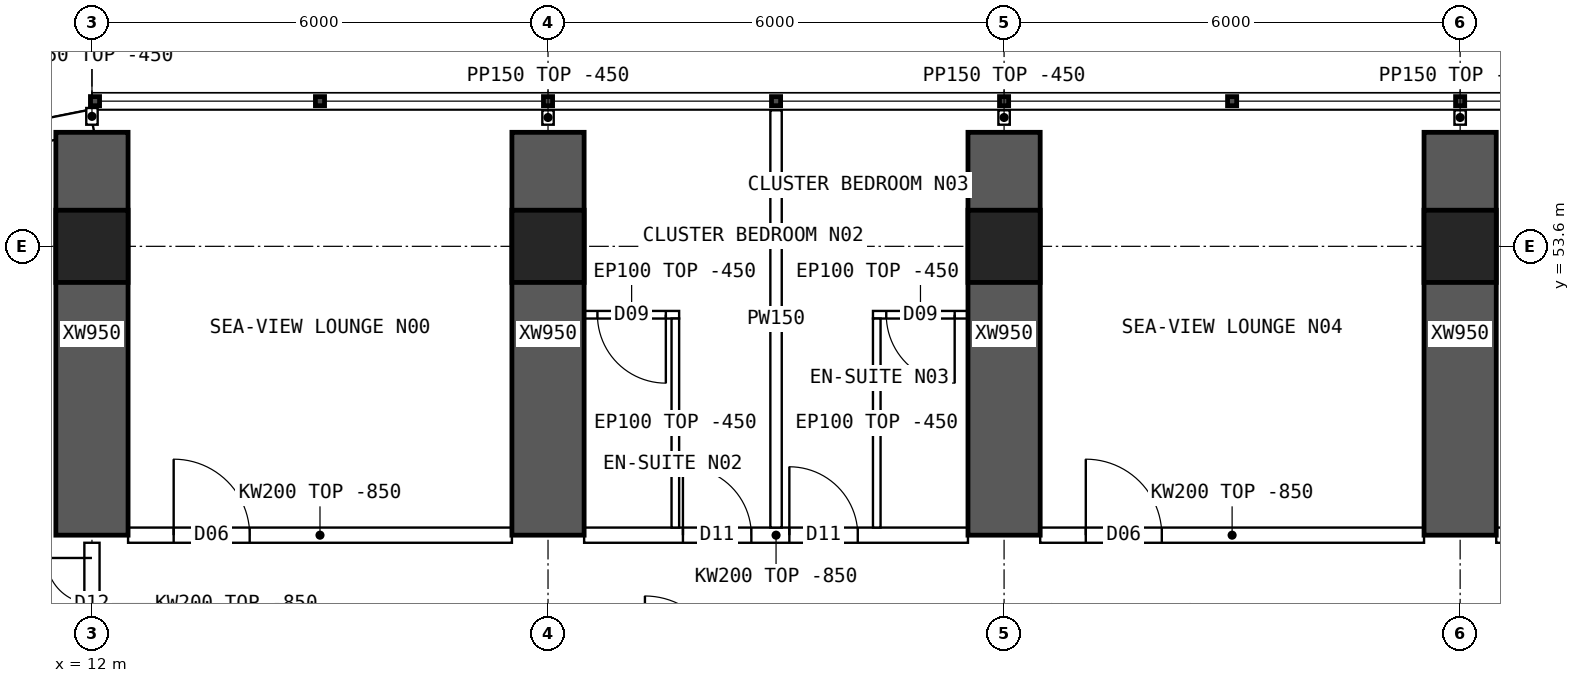
"""IFC4 building model, lengths in metres.
Left out: names, types, materials, properties, quantities, classifications, styles, units other than length and angle.
Written with IfcOpenShell. Run it as: python <this file> out.ifc"""

import sys

from ifc_helpers import new_model, si_unit, direction, frame, frame_2d, origin, origin_2d, place, context, subcontext, project, spatial, polyline, rectangle, hollow_rectangle, outline, extrude, element, fill, save


model = new_model("IFC4")
c1 = context("Model", 3, precision=1e-05, world=origin(), true_north=direction((0.0, 1.0)))
c2 = subcontext(c1, "Body", "Model", "MODEL_VIEW")
j1 = project(units=[si_unit("LENGTHUNIT", "METRE"), si_unit("PLANEANGLEUNIT", "RADIAN")], contexts=[c1])
p1 = place(None, origin())
s1 = spatial("IfcSite", under=j1, at=p1, CompositionType="ELEMENT")
p2 = place(p1, origin())
s2 = spatial("IfcBuilding", under=s1, at=p2, CompositionType="ELEMENT")
p3 = place(p2, frame((0.0, 0.0, 110.65)))
s3 = spatial("IfcBuildingStorey", under=s2, at=p3, CompositionType="ELEMENT", Elevation=110.65)
for number, where, z_axis, x_axis in (
    (1, (12.0, 53.6, 0.0), (0.0, 0.0, 1.0), (1.0, 0.0, 0.0)),
    (2, (18.0, 53.6, 0.0), (0.0, 0.0, 1.0), (1.0, 0.0, 0.0)),
    (3, (24.0, 53.6, 0.0), (0.0, 0.0, 1.0), (1.0, 0.0, 0.0)),
    (4, (30.0, 53.6, 0.0), (0.0, 0.0, 1.0), (1.0, 0.0, 0.0)),
):
    element("IfcColumn", number, at=place(p3, frame(where, z_axis=z_axis, x_axis=x_axis)), inside=s3, PredefinedType="COLUMN", context=c2, shape_type="SweptSolid", body=[
        extrude(hollow_rectangle(XDim=0.95, YDim=0.95, WallThickness=0.095, at=origin_2d()), origin(), (0.0, 0.0, 1.0), 3.75),
    ])
for number, where, z_axis, x_axis in (
    (5, (12.0, 49.8, 0.0), (0.0, 0.0, 1.0), (0.0, 1.0, 0.0)),
    (6, (18.0, 49.8, 0.0), (0.0, 0.0, 1.0), (0.0, 1.0, 0.0)),
    (7, (24.0, 49.8, 0.0), (0.0, 0.0, 1.0), (0.0, 1.0, 0.0)),
    (8, (30.0, 49.8, 0.0), (0.0, 0.0, 1.0), (0.0, 1.0, 0.0)),
):
    element("IfcWall", number, at=place(p3, frame(where, z_axis=z_axis, x_axis=x_axis)), inside=s3, PredefinedType="SHEAR", context=c2, shape_type="SweptSolid", body=[
        extrude(rectangle(XDim=5.3, YDim=0.95, at=frame_2d((2.65, 0.0))), origin(), (0.0, 0.0, 1.0), 3.75),
    ])
p4 = place(p3, frame((12.0, 55.25, 0.0), z_axis=(0.0, 0.0, 1.0), x_axis=(-0.980787251524, -0.195080412259, 0.0)))
e9 = element("IfcWall", 9, at=p4, inside=s3, PredefinedType="SOLIDWALL", context=c2, shape_type="SweptSolid", body=[
    extrude(outline(polyline([(-0.03, -0.15), (3.249, -0.15), (3.189, 0.15), (0.03, 0.15), (-0.03, -0.15)])), origin(), (0.0, 0.0, 1.0), 3.3),
])
p5 = place(p4, frame((0.909, 0.0, 0.9)))
e10 = element("IfcOpeningElement", 10, at=p5, cuts=e9, PredefinedType="OPENING", context=c2, shape_type="SweptSolid", body=[
    extrude(rectangle(XDim=1.4, YDim=1.8, at=frame_2d((0.7, 0.9))), frame((0.0, 0.16, 0.0), z_axis=(0.0, -1.0, 0.0), x_axis=(1.0, 0.0, 0.0)), (0.0, 0.0, 1.0), 0.32),
])
p6 = place(p3, frame((12.475, 49.8, 0.0), z_axis=(0.0, 0.0, 1.0), x_axis=(1.0, 0.0, 0.0)))
e11 = element("IfcWall", 11, at=p6, inside=s3, PredefinedType="SOLIDWALL", context=c2, shape_type="SweptSolid", body=[
    extrude(outline(polyline([(0.0, 0.0), (5.05, 0.0), (5.05, 2.9), (0.0, 2.9), (0.0, 0.0)])), frame((0.0, 0.1, 0.0), z_axis=(0.0, -1.0, 0.0), x_axis=(1.0, 0.0, 0.0)), (0.0, 0.0, 1.0), 0.2),
])
p7 = place(p6, frame((0.6, 0.0, 0.0)))
e12 = element("IfcOpeningElement", 12, at=p7, cuts=e11, PredefinedType="OPENING", context=c2, shape_type="SweptSolid", body=[
    extrude(rectangle(XDim=1.0, YDim=2.1, at=frame_2d((0.5, 1.05))), frame((0.0, 0.11, 0.0), z_axis=(0.0, -1.0, 0.0), x_axis=(1.0, 0.0, 0.0)), (0.0, 0.0, 1.0), 0.22),
])
p8 = place(p3, frame((18.475, 49.8, 0.0), z_axis=(0.0, 0.0, 1.0), x_axis=(1.0, 0.0, 0.0)))
e13 = element("IfcWall", 13, at=p8, inside=s3, PredefinedType="SOLIDWALL", context=c2, shape_type="SweptSolid", body=[
    extrude(outline(polyline([(0.0, 0.0), (5.05, 0.0), (5.05, 2.9), (0.0, 2.9), (0.0, 0.0)])), frame((0.0, 0.1, 0.0), z_axis=(0.0, -1.0, 0.0), x_axis=(1.0, 0.0, 0.0)), (0.0, 0.0, 1.0), 0.2),
])
p9 = place(p8, frame((1.3, 0.0, 0.0)))
e14 = element("IfcOpeningElement", 14, at=p9, cuts=e13, PredefinedType="OPENING", context=c2, shape_type="SweptSolid", body=[
    extrude(rectangle(XDim=0.9, YDim=2.1, at=frame_2d((0.45, 1.05))), frame((0.0, 0.11, 0.0), z_axis=(0.0, -1.0, 0.0), x_axis=(1.0, 0.0, 0.0)), (0.0, 0.0, 1.0), 0.22),
])
p10 = place(p8, frame((2.7, 0.0, 0.0)))
e15 = element("IfcOpeningElement", 15, at=p10, cuts=e13, PredefinedType="OPENING", context=c2, shape_type="SweptSolid", body=[
    extrude(rectangle(XDim=0.9, YDim=2.1, at=frame_2d((0.45, 1.05))), frame((0.0, 0.11, 0.0), z_axis=(0.0, -1.0, 0.0), x_axis=(1.0, 0.0, 0.0)), (0.0, 0.0, 1.0), 0.22),
])
p11 = place(p3, frame((24.475, 49.8, 0.0), z_axis=(0.0, 0.0, 1.0), x_axis=(1.0, 0.0, 0.0)))
e16 = element("IfcWall", 16, at=p11, inside=s3, PredefinedType="SOLIDWALL", context=c2, shape_type="SweptSolid", body=[
    extrude(outline(polyline([(0.0, 0.0), (5.05, 0.0), (5.05, 2.9), (0.0, 2.9), (0.0, 0.0)])), frame((0.0, 0.1, 0.0), z_axis=(0.0, -1.0, 0.0), x_axis=(1.0, 0.0, 0.0)), (0.0, 0.0, 1.0), 0.2),
])
p12 = place(p11, frame((0.6, 0.0, 0.0)))
e17 = element("IfcOpeningElement", 17, at=p12, cuts=e16, PredefinedType="OPENING", context=c2, shape_type="SweptSolid", body=[
    extrude(rectangle(XDim=1.0, YDim=2.1, at=frame_2d((0.5, 1.05))), frame((0.0, 0.11, 0.0), z_axis=(0.0, -1.0, 0.0), x_axis=(1.0, 0.0, 0.0)), (0.0, 0.0, 1.0), 0.22),
])
p13 = place(p3, frame((30.475, 49.8, 0.0), z_axis=(0.0, 0.0, 1.0), x_axis=(1.0, 0.0, 0.0)))
e18 = element("IfcWall", 18, at=p13, inside=s3, PredefinedType="SOLIDWALL", context=c2, shape_type="SweptSolid", body=[
    extrude(outline(polyline([(0.0, 0.0), (5.05, 0.0), (5.05, 2.9), (0.0, 2.9), (0.0, 0.0)])), frame((0.0, 0.1, 0.0), z_axis=(0.0, -1.0, 0.0), x_axis=(1.0, 0.0, 0.0)), (0.0, 0.0, 1.0), 0.2),
])
p14 = place(p13, frame((0.6, 0.0, 0.0)))
e19 = element("IfcOpeningElement", 19, at=p14, cuts=e18, PredefinedType="OPENING", context=c2, shape_type="SweptSolid", body=[
    extrude(rectangle(XDim=1.0, YDim=2.1, at=frame_2d((0.5, 1.05))), frame((0.0, 0.11, 0.0), z_axis=(0.0, -1.0, 0.0), x_axis=(1.0, 0.0, 0.0)), (0.0, 0.0, 1.0), 0.22),
])
p15 = place(p3, frame((21.0, 55.39, 0.0), z_axis=(0.0, 0.0, 1.0), x_axis=(0.0, -1.0, 0.0)))
e20 = element("IfcWall", 20, at=p15, inside=s3, PredefinedType="PARTITIONING", context=c2, shape_type="SweptSolid", body=[
    extrude(outline(polyline([(0.0, 0.0), (5.49, 0.0), (5.49, 2.9), (5.442, 2.9), (5.44, 3.3), (1.992, 3.3), (1.99, 2.9), (1.592, 2.9), (1.59, 3.3), (0.0, 3.3), (0.0, 0.0)])), frame((0.0, 0.075, 0.0), z_axis=(0.0, -1.0, 0.0), x_axis=(1.0, 0.0, 0.0)), (0.0, 0.0, 1.0), 0.15),
])
p16 = place(p3, frame((18.475, 52.7, 0.0), z_axis=(0.0, 0.0, 1.0), x_axis=(1.0, 0.0, 0.0)))
e21 = element("IfcWall", 21, at=p16, inside=s3, PredefinedType="PARTITIONING", context=c2, shape_type="SweptSolid", body=[
    extrude(rectangle(XDim=1.25, YDim=0.1, at=frame_2d((0.625, 0.0))), origin(), (0.0, 0.0, 1.0), 3.3),
])
p17 = place(p16, frame((0.175, 0.0, 0.0)))
e22 = element("IfcOpeningElement", 22, at=p17, cuts=e21, PredefinedType="OPENING", context=c2, shape_type="SweptSolid", body=[
    extrude(rectangle(XDim=0.9, YDim=2.1, at=frame_2d((0.45, 1.05))), frame((0.0, 0.06, 0.0), z_axis=(0.0, -1.0, 0.0), x_axis=(1.0, 0.0, 0.0)), (0.0, 0.0, 1.0), 0.12),
])
p18 = place(p3, frame((19.675, 52.65, 0.0), z_axis=(0.0, 0.0, 1.0), x_axis=(0.0, -1.0, 0.0)))
e23 = element("IfcWall", 23, at=p18, inside=s3, PredefinedType="PARTITIONING", context=c2, shape_type="SweptSolid", body=[
    extrude(outline(polyline([(0.0, 0.0), (2.75, 0.0), (2.75, 2.9), (2.702, 2.9), (2.7, 3.3), (0.0, 3.3), (0.0, 0.0)])), frame((0.0, 0.05, 0.0), z_axis=(0.0, -1.0, 0.0), x_axis=(1.0, 0.0, 0.0)), (0.0, 0.0, 1.0), 0.1),
])
p19 = place(p3, frame((22.275, 52.7, 0.0), z_axis=(0.0, 0.0, 1.0), x_axis=(1.0, 0.0, 0.0)))
e24 = element("IfcWall", 24, at=p19, inside=s3, PredefinedType="PARTITIONING", context=c2, shape_type="SweptSolid", body=[
    extrude(rectangle(XDim=1.25, YDim=0.1, at=frame_2d((0.625, 0.0))), origin(), (0.0, 0.0, 1.0), 3.3),
])
p20 = place(p19, frame((0.175, 0.0, 0.0)))
e25 = element("IfcOpeningElement", 25, at=p20, cuts=e24, PredefinedType="OPENING", context=c2, shape_type="SweptSolid", body=[
    extrude(rectangle(XDim=0.9, YDim=2.1, at=frame_2d((0.45, 1.05))), frame((0.0, 0.06, 0.0), z_axis=(0.0, -1.0, 0.0), x_axis=(1.0, 0.0, 0.0)), (0.0, 0.0, 1.0), 0.12),
])
p21 = place(p3, frame((22.325, 52.65, 0.0), z_axis=(0.0, 0.0, 1.0), x_axis=(0.0, -1.0, 0.0)))
e26 = element("IfcWall", 26, at=p21, inside=s3, PredefinedType="PARTITIONING", context=c2, shape_type="SweptSolid", body=[
    extrude(outline(polyline([(0.0, 0.0), (2.75, 0.0), (2.75, 2.9), (2.702, 2.9), (2.7, 3.3), (0.0, 3.3), (0.0, 0.0)])), frame((0.0, 0.05, 0.0), z_axis=(0.0, -1.0, 0.0), x_axis=(1.0, 0.0, 0.0)), (0.0, 0.0, 1.0), 0.1),
])
p22 = place(p3, frame((12.0, 48.1, 0.0), z_axis=(0.0, 0.0, 1.0), x_axis=(0.0, 1.0, 0.0)))
e27 = element("IfcWall", 27, at=p22, inside=s3, PredefinedType="SOLIDWALL", context=c2, shape_type="SweptSolid", body=[
    extrude(outline(polyline([(0.0, 0.0), (1.6, 0.0), (1.6, 2.9), (0.0, 2.9), (0.0, 0.0)])), frame((0.0, 0.1, 0.0), z_axis=(0.0, -1.0, 0.0), x_axis=(1.0, 0.0, 0.0)), (0.0, 0.0, 1.0), 0.2),
])
p23 = place(p22, frame((0.2, 0.0, 0.0)))
e28 = element("IfcOpeningElement", 28, at=p23, cuts=e27, PredefinedType="OPENING", context=c2, shape_type="SweptSolid", body=[
    extrude(rectangle(XDim=1.2, YDim=2.1, at=frame_2d((0.6, 1.05))), frame((0.0, 0.11, 0.0), z_axis=(0.0, -1.0, 0.0), x_axis=(1.0, 0.0, 0.0)), (0.0, 0.0, 1.0), 0.22),
])
p24 = place(p3, frame((12.0, 55.2, 0.0), z_axis=(0.0, 0.0, 1.0), x_axis=(0.0, 1.0, 0.0)))
e29 = element("IfcWall", 29, at=p24, inside=s3, PredefinedType="PARTITIONING", context=c2, shape_type="SweptSolid", body=[
    extrude(rectangle(XDim=0.22, YDim=0.15, at=frame_2d((0.11, 0.0))), origin(), (0.0, 0.0, 1.0), 3.3),
])
for number, where, z_axis, x_axis in (
    (30, (18.0, 55.2, 0.0), (0.0, 0.0, 1.0), (0.0, 1.0, 0.0)),
    (31, (24.0, 55.2, 0.0), (0.0, 0.0, 1.0), (0.0, 1.0, 0.0)),
    (32, (30.0, 55.2, 0.0), (0.0, 0.0, 1.0), (0.0, 1.0, 0.0)),
):
    element("IfcWall", number, at=place(p3, frame(where, z_axis=z_axis, x_axis=x_axis)), inside=s3, PredefinedType="PARTITIONING", context=c2, shape_type="SweptSolid", body=[
        extrude(rectangle(XDim=0.19, YDim=0.15, at=frame_2d((0.095, 0.0))), origin(), (0.0, 0.0, 1.0), 3.3),
    ])
p25 = place(p7, origin())
e33 = element("IfcDoor", 33, at=p25, inside=s3, OperationType="SINGLE_SWING_LEFT", PredefinedType="DOOR", context=c2, shape_type="SweptSolid", body=[
    extrude(rectangle(XDim=1.0, YDim=2.1, at=frame_2d((0.5, 1.05))), frame((0.0, 0.025, 0.0), z_axis=(0.0, -1.0, 0.0), x_axis=(1.0, 0.0, 0.0)), (0.0, 0.0, 1.0), 0.05),
])
fill(e12, e33)
p26 = place(p17, origin())
e34 = element("IfcDoor", 34, at=p26, inside=s3, OperationType="SINGLE_SWING_RIGHT", PredefinedType="DOOR", context=c2, shape_type="SweptSolid", body=[
    extrude(rectangle(XDim=0.9, YDim=2.1, at=frame_2d((0.45, 1.05))), frame((0.0, 0.025, 0.0), z_axis=(0.0, -1.0, 0.0), x_axis=(1.0, 0.0, 0.0)), (0.0, 0.0, 1.0), 0.05),
])
fill(e22, e34)
p27 = place(p9, origin())
e35 = element("IfcDoor", 35, at=p27, inside=s3, OperationType="SINGLE_SWING_LEFT", PredefinedType="DOOR", context=c2, shape_type="SweptSolid", body=[
    extrude(rectangle(XDim=0.9, YDim=2.1, at=frame_2d((0.45, 1.05))), frame((0.0, 0.025, 0.0), z_axis=(0.0, -1.0, 0.0), x_axis=(1.0, 0.0, 0.0)), (0.0, 0.0, 1.0), 0.05),
])
fill(e14, e35)
p28 = place(p20, origin())
e36 = element("IfcDoor", 36, at=p28, inside=s3, OperationType="SINGLE_SWING_RIGHT", PredefinedType="DOOR", context=c2, shape_type="SweptSolid", body=[
    extrude(rectangle(XDim=0.9, YDim=2.1, at=frame_2d((0.45, 1.05))), frame((0.0, 0.025, 0.0), z_axis=(0.0, -1.0, 0.0), x_axis=(1.0, 0.0, 0.0)), (0.0, 0.0, 1.0), 0.05),
])
fill(e25, e36)
p29 = place(p10, origin())
e37 = element("IfcDoor", 37, at=p29, inside=s3, OperationType="SINGLE_SWING_LEFT", PredefinedType="DOOR", context=c2, shape_type="SweptSolid", body=[
    extrude(rectangle(XDim=0.9, YDim=2.1, at=frame_2d((0.45, 1.05))), frame((0.0, 0.025, 0.0), z_axis=(0.0, -1.0, 0.0), x_axis=(1.0, 0.0, 0.0)), (0.0, 0.0, 1.0), 0.05),
])
fill(e15, e37)
p30 = place(p12, origin())
e38 = element("IfcDoor", 38, at=p30, inside=s3, OperationType="SINGLE_SWING_LEFT", PredefinedType="DOOR", context=c2, shape_type="SweptSolid", body=[
    extrude(rectangle(XDim=1.0, YDim=2.1, at=frame_2d((0.5, 1.05))), frame((0.0, 0.025, 0.0), z_axis=(0.0, -1.0, 0.0), x_axis=(1.0, 0.0, 0.0)), (0.0, 0.0, 1.0), 0.05),
])
fill(e17, e38)
p31 = place(p23, origin())
e39 = element("IfcDoor", 39, at=p31, inside=s3, OperationType="DOUBLE_DOOR_SINGLE_SWING", PredefinedType="DOOR", context=c2, shape_type="SweptSolid", body=[
    extrude(rectangle(XDim=1.2, YDim=2.1, at=frame_2d((0.6, 1.05))), frame((0.0, 0.025, 0.0), z_axis=(0.0, -1.0, 0.0), x_axis=(1.0, 0.0, 0.0)), (0.0, 0.0, 1.0), 0.05),
])
fill(e28, e39)
save(model, sys.argv[1])
